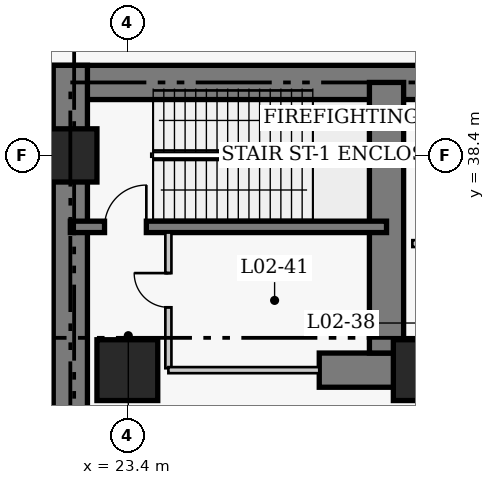
"""IFC4 building model, lengths in metres.
Left out: names, types, materials, properties, quantities, classifications, styles, units other than length and angle.
Written with IfcOpenShell. Run it as: python <this file> out.ifc"""

import sys

from ifc_helpers import new_model, si_unit, direction, frame, frame_2d, origin, origin_2d, place, context, subcontext, project, spatial, rectangle, extrude, element, fill, save


model = new_model("IFC4")
c1 = context("Model", 3, precision=1e-05, world=origin(), true_north=direction((0.0, 1.0)))
c2 = subcontext(c1, "Body", "Model", "MODEL_VIEW")
j1 = project(units=[si_unit("LENGTHUNIT", "METRE"), si_unit("PLANEANGLEUNIT", "RADIAN")], contexts=[c1])
p1 = place(None, origin())
s1 = spatial("IfcSite", under=j1, at=p1, CompositionType="ELEMENT")
p2 = place(p1, origin())
s2 = spatial("IfcBuilding", under=s1, at=p2, CompositionType="ELEMENT")
p3 = place(p2, frame((0.0, 0.0, 10.4)))
s3 = spatial("IfcBuildingStorey", under=s2, at=p3, CompositionType="ELEMENT", Elevation=10.4)
p4 = place(p3, frame((21.45, 40.32, 0.0), z_axis=(0.0, 0.0, 1.0), x_axis=(1.0, 0.0, 0.0)))
e1 = element("IfcWall", 1, at=p4, inside=s3, PredefinedType="SHEAR", context=c2, shape_type="SweptSolid", body=[
    extrude(rectangle(XDim=14.4, YDim=0.9, at=frame_2d((7.2, 0.0))), origin(), (0.0, 0.0, 1.0), 5.4),
])
p5 = place(p3, frame((21.9, 27.05, 0.0), z_axis=(0.0, 0.0, 1.0), x_axis=(0.0, 1.0, 0.0)))
e2 = element("IfcWall", 2, at=p5, inside=s3, PredefinedType="SHEAR", context=c2, shape_type="SweptSolid", body=[
    extrude(rectangle(XDim=13.72, YDim=0.9, at=frame_2d((6.86, 0.0))), origin(), (0.0, 0.0, 1.0), 5.4),
])
p6 = place(p3, frame((28.45, 32.75, 0.0), z_axis=(0.0, 0.0, 1.0), x_axis=(1.0, 0.0, 0.0)))
e3 = element("IfcWall", 3, at=p6, inside=s3, PredefinedType="SHEAR", context=c2, shape_type="SweptSolid", body=[
    extrude(rectangle(XDim=2.4, YDim=0.9, at=frame_2d((1.2, 0.0))), origin(), (0.0, 0.0, 1.0), 5.4),
])
p7 = place(p3, frame((30.22, 33.2, 0.0), z_axis=(0.0, 0.0, 1.0), x_axis=(0.0, 1.0, 0.0)))
e4 = element("IfcWall", 4, at=p7, inside=s3, PredefinedType="SHEAR", context=c2, shape_type="SweptSolid", body=[
    extrude(rectangle(XDim=7.12, YDim=0.9, at=frame_2d((3.56, 0.0))), origin(), (0.0, 0.0, 1.0), 5.4),
])
p8 = place(p3, frame((21.9, 36.52, 0.0), z_axis=(0.0, 0.0, 1.0), x_axis=(1.0, 0.0, 0.0)))
e5 = element("IfcWall", 5, at=p8, inside=s3, PredefinedType="SHEAR", context=c2, shape_type="SweptSolid", body=[
    extrude(rectangle(XDim=8.32, YDim=0.3, at=frame_2d((4.16, 0.0))), origin(), (0.0, 0.0, 1.0), 5.4),
])
p9 = place(p8, frame((0.9, 0.0, 0.0)))
e6 = element("IfcOpeningElement", 6, at=p9, cuts=e5, PredefinedType="OPENING", context=c2, shape_type="SweptSolid", body=[
    extrude(rectangle(XDim=1.1, YDim=2.15, at=frame_2d((0.55, 1.075))), frame((0.0, 0.16, 0.0), z_axis=(0.0, -1.0, 0.0), x_axis=(1.0, 0.0, 0.0)), (0.0, 0.0, 1.0), 0.32),
])
p10 = place(p3, frame((21.9, 38.4, 0.0), z_axis=(0.0, 0.0, 1.0), x_axis=(1.0, 0.0, 0.0)))
e7 = element("IfcColumn", 7, at=p10, inside=s3, PredefinedType="COLUMN", context=c2, shape_type="SweptSolid", body=[
    extrude(rectangle(XDim=1.4, YDim=1.4, at=origin_2d()), origin(), (0.0, 0.0, 1.0), 5.4),
])
for number, where, z_axis, x_axis in (
    (8, (23.4, 32.75, 0.0), (0.0, 0.0, 1.0), (1.0, 0.0, 0.0)),
    (9, (31.2, 32.75, 0.0), (0.0, 0.0, 1.0), (1.0, 0.0, 0.0)),
):
    element("IfcColumn", number, at=place(p3, frame(where, z_axis=z_axis, x_axis=x_axis)), inside=s3, PredefinedType="COLUMN", context=c2, shape_type="SweptSolid", body=[
        extrude(rectangle(XDim=1.6, YDim=1.6, at=origin_2d()), origin(), (0.0, 0.0, 1.0), 5.4),
    ])
p11 = place(p3, frame((30.9, 36.08, 0.0), z_axis=(0.0, 0.0, 1.0), x_axis=(1.0, 0.0, 0.0)))
e10 = element("IfcWall", 10, at=p11, inside=s3, PredefinedType="PARTITIONING", context=c2, shape_type="SweptSolid", body=[
    extrude(rectangle(XDim=1.85, YDim=0.18, at=frame_2d((0.925, 0.0))), origin(), (0.0, 0.0, 1.0), 5.1),
])
p12 = place(p11, frame((0.48, 0.0, 0.0)))
e11 = element("IfcOpeningElement", 11, at=p12, cuts=e10, PredefinedType="OPENING", context=c2, shape_type="SweptSolid", body=[
    extrude(rectangle(XDim=0.9, YDim=2.15, at=frame_2d((0.45, 1.075))), frame((0.0, 0.1, 0.0), z_axis=(0.0, -1.0, 0.0), x_axis=(1.0, 0.0, 0.0)), (0.0, 0.0, 1.0), 0.2),
])
p13 = place(p3, frame((24.48, 32.8, 0.0), z_axis=(0.0, 0.0, 1.0), x_axis=(0.0, 1.0, 0.0)))
e12 = element("IfcWall", 12, at=p13, inside=s3, PredefinedType="PARTITIONING", context=c2, shape_type="SweptSolid", body=[
    extrude(rectangle(XDim=3.57, YDim=0.16, at=frame_2d((1.785, 0.0))), origin(), (0.0, 0.0, 1.0), 5.1),
])
p14 = place(p13, frame((1.604, 0.0, 0.0)))
e13 = element("IfcOpeningElement", 13, at=p14, cuts=e12, PredefinedType="OPENING", context=c2, shape_type="SweptSolid", body=[
    extrude(rectangle(XDim=0.9, YDim=2.1, at=frame_2d((0.45, 1.05))), frame((0.0, 0.09, 0.0), z_axis=(0.0, -1.0, 0.0), x_axis=(1.0, 0.0, 0.0)), (0.0, 0.0, 1.0), 0.18),
])
p15 = place(p3, frame((24.48, 32.75, 0.0), z_axis=(0.0, 0.0, 1.0), x_axis=(1.0, 0.0, 0.0)))
e14 = element("IfcWall", 14, at=p15, inside=s3, PredefinedType="PARTITIONING", context=c2, shape_type="SweptSolid", body=[
    extrude(rectangle(XDim=3.97, YDim=0.16, at=frame_2d((1.985, 0.0))), origin(), (0.0, 0.0, 1.0), 5.1),
])
p16 = place(p14, origin())
e15 = element("IfcDoor", 15, at=p16, inside=s3, OperationType="SINGLE_SWING_RIGHT", PredefinedType="DOOR", context=c2, shape_type="SweptSolid", body=[
    extrude(rectangle(XDim=0.9, YDim=2.1, at=frame_2d((0.45, 1.05))), frame((0.0, 0.025, 0.0), z_axis=(0.0, -1.0, 0.0), x_axis=(1.0, 0.0, 0.0)), (0.0, 0.0, 1.0), 0.05),
])
fill(e13, e15)
p17 = place(p9, origin())
e16 = element("IfcDoor", 16, at=p17, inside=s3, OperationType="SINGLE_SWING_RIGHT", PredefinedType="DOOR", context=c2, shape_type="SweptSolid", body=[
    extrude(rectangle(XDim=1.1, YDim=2.15, at=frame_2d((0.55, 1.075))), frame((0.0, 0.025, 0.0), z_axis=(0.0, -1.0, 0.0), x_axis=(1.0, 0.0, 0.0)), (0.0, 0.0, 1.0), 0.05),
])
fill(e6, e16)
save(model, sys.argv[1])
